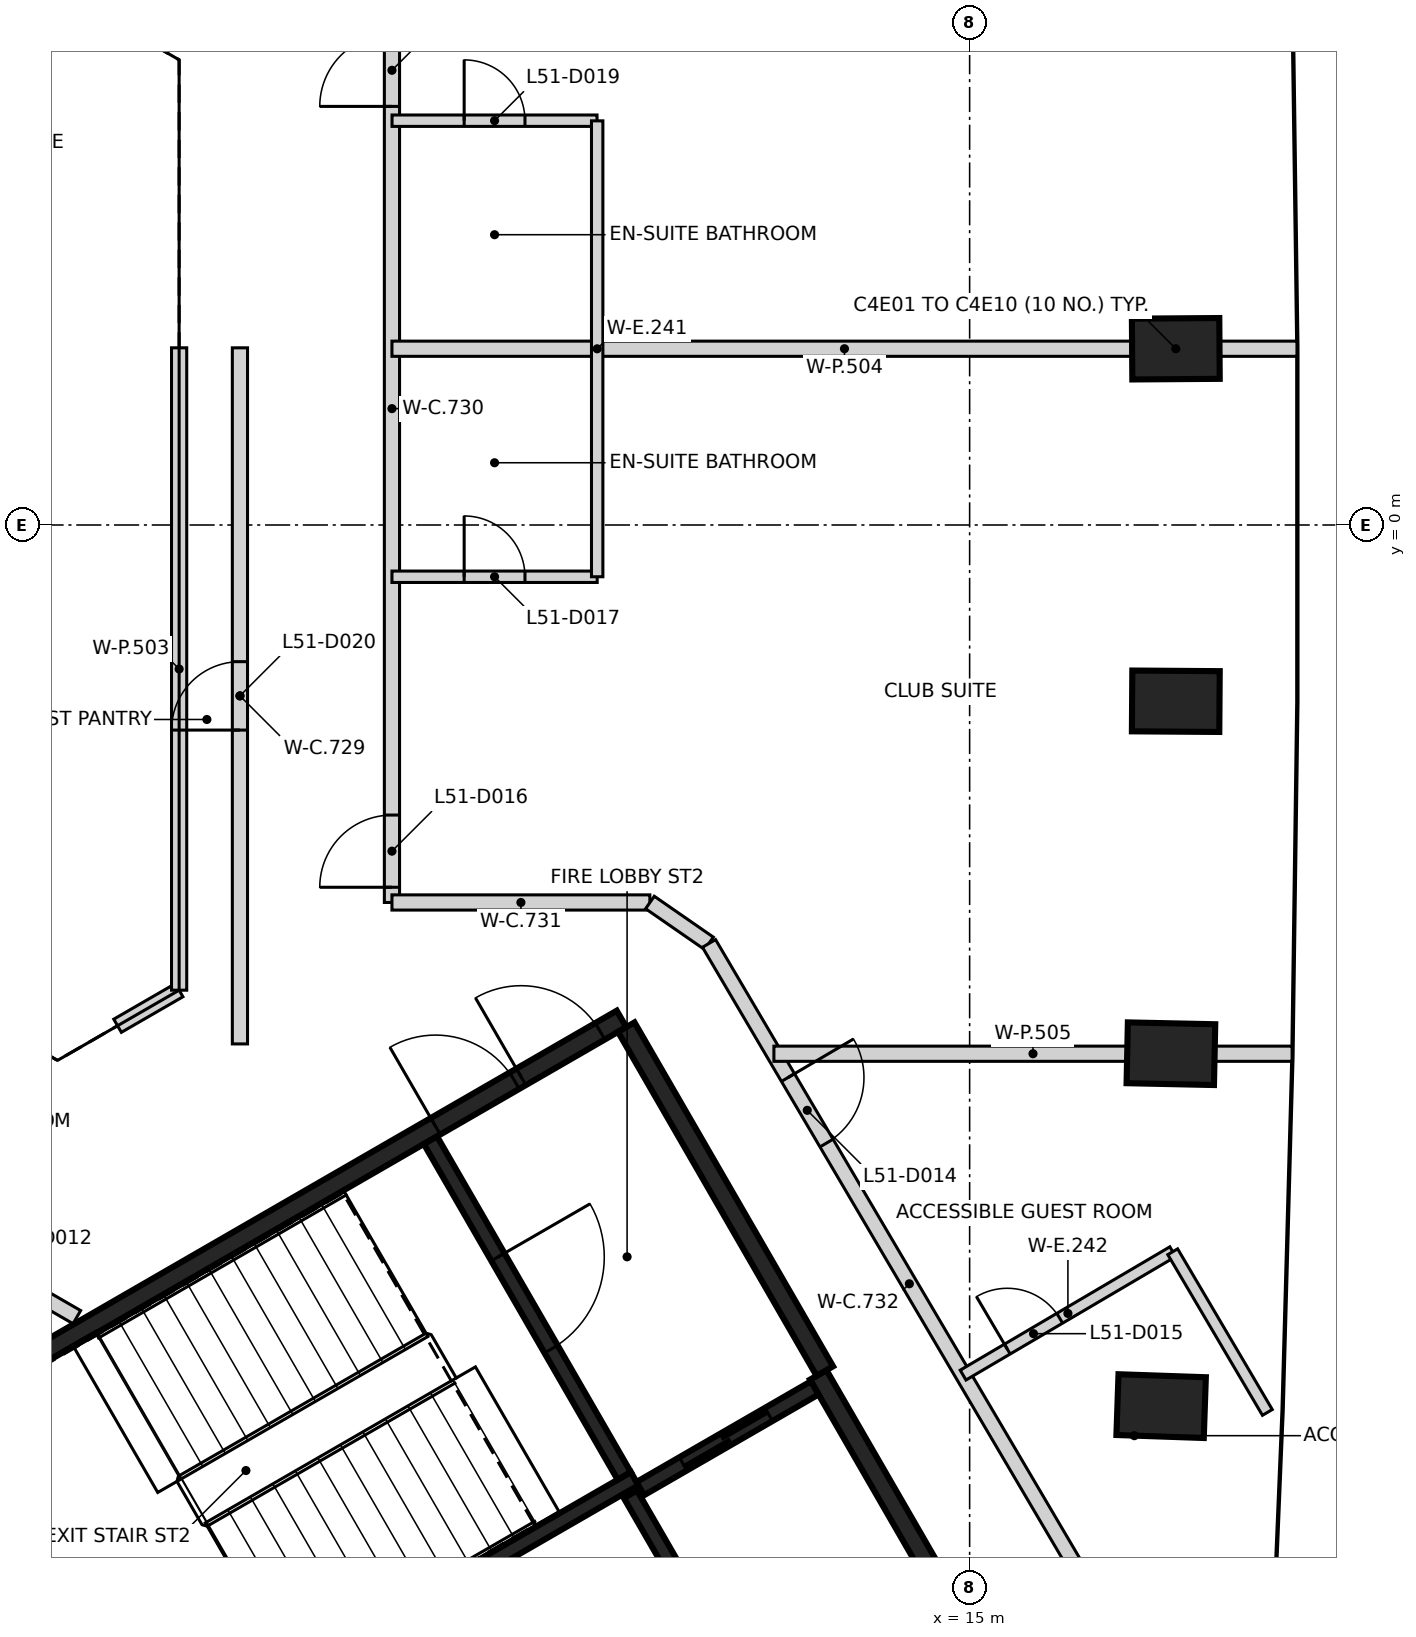
"""IFC4 building model, lengths in metres.
Left out: names, types, materials, properties, quantities, classifications, styles, units other than length and angle.
Written with IfcOpenShell. Run it as: python <this file> out.ifc"""

import sys

from ifc_helpers import new_model, si_unit, direction, frame, frame_2d, origin, origin_2d, place, context, subcontext, project, spatial, rectangle, extrude, element, fill, save


model = new_model("IFC4")
c1 = context("Model", 3, precision=1e-05, world=origin(), true_north=direction((0.0, 1.0)))
c2 = subcontext(c1, "Body", "Model", "MODEL_VIEW")
j1 = project(units=[si_unit("LENGTHUNIT", "METRE"), si_unit("PLANEANGLEUNIT", "RADIAN")], contexts=[c1])
p1 = place(None, origin())
s1 = spatial("IfcSite", under=j1, at=p1, CompositionType="ELEMENT")
p2 = place(p1, origin())
s2 = spatial("IfcBuilding", under=s1, at=p2, CompositionType="ELEMENT")
p3 = place(p2, frame((0.0, 0.0, 204.4)))
s3 = spatial("IfcBuildingStorey", under=s2, at=p3, CompositionType="ELEMENT", Elevation=204.4)
for number, where, z_axis, x_axis in (
    (1, (17.519, -11.592, -0.35), (0.0, 0.0, 1.0), (-0.999, 0.034, 0.0)),
    (2, (17.648, -6.956, -0.35), (0.0, 0.0, 1.0), (-1.0, 0.021, 0.0)),
    (3, (17.712, -2.319, -0.35), (0.0, 0.0, 1.0), (-1.0, 0.007, 0.0)),
    (4, (17.712, 2.319, -0.35), (0.0, 0.0, 1.0), (1.0, 0.007, 0.0)),
):
    element("IfcColumn", number, at=place(p3, frame(where, z_axis=z_axis, x_axis=x_axis)), inside=s3, PredefinedType="COLUMN", context=c2, shape_type="SweptSolid", body=[
        extrude(rectangle(XDim=1.15, YDim=0.8, at=origin_2d()), origin(), (0.0, 0.0, 1.0), 3.6),
    ])
p4 = place(p3, frame((0.417, -12.273, 0.0), z_axis=(0.0, 0.0, 1.0), x_axis=(0.866021906294, 0.500006057782, 0.0)))
e5 = element("IfcWall", 5, at=p4, inside=s3, PredefinedType="SHEAR", context=c2, shape_type="SweptSolid", body=[
    extrude(rectangle(XDim=11.55, YDim=0.25, at=frame_2d((5.775, 0.0))), origin(), (0.0, 0.0, 1.0), 3.25),
])
p5 = place(p4, frame((10.025, 0.0, 0.0)))
e6 = element("IfcOpeningElement", 6, at=p5, cuts=e5, PredefinedType="OPENING", context=c2, shape_type="SweptSolid", body=[
    extrude(rectangle(XDim=1.2, YDim=2.1, at=frame_2d((0.6, 1.05))), frame((0.0, 0.135, 0.0), z_axis=(0.0, -1.0, 0.0), x_axis=(1.0, 0.0, 0.0)), (0.0, 0.0, 1.0), 0.27),
])
p6 = place(p4, frame((8.725, 0.0, 0.0)))
e7 = element("IfcOpeningElement", 7, at=p6, cuts=e5, PredefinedType="OPENING", context=c2, shape_type="SweptSolid", body=[
    extrude(rectangle(XDim=1.2, YDim=2.1, at=frame_2d((0.6, 1.05))), frame((0.0, 0.135, 0.0), z_axis=(0.0, -1.0, 0.0), x_axis=(1.0, 0.0, 0.0)), (0.0, 0.0, 1.0), 0.27),
])
p7 = place(p3, frame((13.008, -11.181, 0.0), z_axis=(0.0, 0.0, 1.0), x_axis=(0.500001955336, -0.866024274868, 0.0)))
e8 = element("IfcWall", 8, at=p7, inside=s3, PredefinedType="SHEAR", context=c2, shape_type="SweptSolid", body=[
    extrude(rectangle(XDim=6.125, YDim=0.25, at=frame_2d((3.062, 0.0))), origin(), (0.0, 0.0, 1.0), 3.25),
])
p8 = place(p7, frame((3.563, 0.0, 0.0)))
e9 = element("IfcOpeningElement", 9, at=p8, cuts=e8, PredefinedType="OPENING", context=c2, shape_type="SweptSolid", body=[
    extrude(rectangle(XDim=1.0, YDim=2.1, at=frame_2d((0.5, 1.05))), frame((0.0, 0.135, 0.0), z_axis=(0.0, -1.0, 0.0), x_axis=(1.0, 0.0, 0.0)), (0.0, 0.0, 1.0), 0.27),
])
p9 = place(p3, frame((3.235, -17.153, 0.0), z_axis=(0.0, 0.0, 1.0), x_axis=(-0.500008851346, 0.866020293397, 0.0)))
e10 = element("IfcWall", 10, at=p9, inside=s3, PredefinedType="SHEAR", context=c2, shape_type="SweptSolid", body=[
    extrude(rectangle(XDim=5.51, YDim=0.25, at=frame_2d((2.755, 0.0))), origin(), (0.0, 0.0, 1.0), 3.25),
])
p10 = place(p3, frame((10.483, -6.606, 0.0), z_axis=(0.0, 0.0, 1.0), x_axis=(0.49999885962, -0.866026062182, 0.0)))
e11 = element("IfcWall", 11, at=p10, inside=s3, PredefinedType="SHEAR", context=c2, shape_type="SweptSolid", body=[
    extrude(rectangle(XDim=5.225, YDim=0.25, at=frame_2d((2.612, 0.0))), origin(), (0.0, 0.0, 1.0), 3.25),
])
p11 = place(p3, frame((5.419, -15.534, 0.0), z_axis=(0.0, 0.0, 1.0), x_axis=(0.866029065029, 0.499993658486, 0.0)))
e12 = element("IfcWall", 12, at=p11, inside=s3, PredefinedType="SHEAR", context=c2, shape_type="SweptSolid", body=[
    extrude(rectangle(XDim=5.974, YDim=0.2, at=frame_2d((2.987, 0.0))), origin(), (0.0, 0.0, 1.0), 3.25),
])
p12 = place(p3, frame((7.906, -8.094, 0.0), z_axis=(0.0, 0.0, 1.0), x_axis=(0.500027839223, -0.866009330205, 0.0)))
e13 = element("IfcWall", 13, at=p12, inside=s3, PredefinedType="SHEAR", context=c2, shape_type="SweptSolid", body=[
    extrude(rectangle(XDim=5.098, YDim=0.2, at=frame_2d((2.549, 0.0))), origin(), (0.0, 0.0, 1.0), 3.25),
])
p13 = place(p12, frame((1.774, 0.0, 0.0)))
e14 = element("IfcOpeningElement", 14, at=p13, cuts=e13, PredefinedType="OPENING", context=c2, shape_type="SweptSolid", body=[
    extrude(rectangle(XDim=1.4, YDim=2.1, at=frame_2d((0.7, 1.05))), frame((0.0, 0.11, 0.0), z_axis=(0.0, -1.0, 0.0), x_axis=(1.0, 0.0, 0.0)), (0.0, 0.0, 1.0), 0.22),
])
p14 = place(p3, frame((12.088, -15.437, 0.0), z_axis=(0.0, 0.0, 1.0), x_axis=(-0.500026960575, 0.86600983753, 0.0)))
e15 = element("IfcWall", 15, at=p14, inside=s3, PredefinedType="SHEAR", context=c2, shape_type="SweptSolid", body=[
    extrude(rectangle(XDim=3.1, YDim=0.2, at=frame_2d((1.55, 0.0))), origin(), (0.0, 0.0, 1.0), 3.25),
])
p15 = place(p3, frame((10.666, -12.678, 0.0), z_axis=(0.0, 0.0, 1.0), x_axis=(0.866018407898, 0.500012117035, 0.0)))
e16 = element("IfcWall", 16, at=p15, inside=s3, PredefinedType="SHEAR", context=c2, shape_type="SweptSolid", body=[
    extrude(rectangle(XDim=2.651, YDim=0.2, at=frame_2d((1.325, 0.0))), origin(), (0.0, 0.0, 1.0), 3.25),
])
p16 = place(p15, frame((0.652, 0.0, 0.0)))
e17 = element("IfcOpeningElement", 17, at=p16, cuts=e16, PredefinedType="OPENING", context=c2, shape_type="SweptSolid", body=[
    extrude(rectangle(XDim=1.3, YDim=2.1, at=frame_2d((0.65, 1.05))), frame((0.0, 0.11, 0.0), z_axis=(0.0, -1.0, 0.0), x_axis=(1.0, 0.0, 0.0)), (0.0, 0.0, 1.0), 0.22),
])
p17 = place(p3, frame((-8.001, -3.926, 0.0), z_axis=(0.0, 0.0, 1.0), x_axis=(0.866131158271, -0.499816783104, 0.0)))
e18 = element("IfcWall", 18, at=p17, inside=s3, PredefinedType="PARTITIONING", context=c2, shape_type="SweptSolid", body=[
    extrude(rectangle(XDim=12.995, YDim=0.2, at=frame_2d((6.498, 0.0))), origin(), (0.0, 0.0, 1.0), 3.25),
])
p18 = place(p17, frame((6.146, 0.0, 0.0)))
e19 = element("IfcOpeningElement", 19, at=p18, cuts=e18, PredefinedType="OPENING", context=c2, shape_type="SweptSolid", body=[
    extrude(rectangle(XDim=0.95, YDim=2.1, at=frame_2d((0.475, 1.05))), frame((0.0, 0.11, 0.0), z_axis=(0.0, -1.0, 0.0), x_axis=(1.0, 0.0, 0.0)), (0.0, 0.0, 1.0), 0.22),
])
p19 = place(p17, frame((10.472, 0.0, 0.0)))
e20 = element("IfcOpeningElement", 20, at=p19, cuts=e18, PredefinedType="OPENING", context=c2, shape_type="SweptSolid", body=[
    extrude(rectangle(XDim=0.95, YDim=2.1, at=frame_2d((0.475, 1.05))), frame((0.0, 0.11, 0.0), z_axis=(0.0, -1.0, 0.0), x_axis=(1.0, 0.0, 0.0)), (0.0, 0.0, 1.0), 0.22),
])
p20 = place(p3, frame((-4.718, 3.511, 0.0), z_axis=(0.0, 0.0, 1.0), x_axis=(0.865989775611, 0.500061704731, 0.0)))
e21 = element("IfcWall", 21, at=p20, inside=s3, PredefinedType="PARTITIONING", context=c2, shape_type="SweptSolid", body=[
    extrude(rectangle(XDim=9.157, YDim=0.2, at=frame_2d((4.579, 0.0))), origin(), (0.0, 0.0, 1.0), 3.25),
])
p21 = place(p20, frame((4.128, 0.0, 0.0)))
e22 = element("IfcOpeningElement", 22, at=p21, cuts=e21, PredefinedType="OPENING", context=c2, shape_type="SweptSolid", body=[
    extrude(rectangle(XDim=0.9, YDim=2.1, at=frame_2d((0.45, 1.05))), frame((0.0, 0.11, 0.0), z_axis=(0.0, -1.0, 0.0), x_axis=(1.0, 0.0, 0.0)), (0.0, 0.0, 1.0), 0.22),
])
p22 = place(p3, frame((5.4, -6.827, 0.0), z_axis=(0.0, 0.0, 1.0), x_axis=(0.0, 1.0, 0.0)))
e23 = element("IfcWall", 23, at=p22, inside=s3, PredefinedType="PARTITIONING", context=c2, shape_type="SweptSolid", body=[
    extrude(rectangle(XDim=9.158, YDim=0.2, at=frame_2d((4.579, 0.0))), origin(), (0.0, 0.0, 1.0), 3.25),
])
p23 = place(p22, frame((4.129, 0.0, 0.0)))
e24 = element("IfcOpeningElement", 24, at=p23, cuts=e23, PredefinedType="OPENING", context=c2, shape_type="SweptSolid", body=[
    extrude(rectangle(XDim=0.9, YDim=2.1, at=frame_2d((0.45, 1.05))), frame((0.0, 0.11, 0.0), z_axis=(0.0, -1.0, 0.0), x_axis=(1.0, 0.0, 0.0)), (0.0, 0.0, 1.0), 0.22),
])
p24 = place(p3, frame((7.4, -4.966, 0.0), z_axis=(0.0, 0.0, 1.0), x_axis=(0.0, 1.0, 0.0)))
e25 = element("IfcWall", 25, at=p24, inside=s3, PredefinedType="PARTITIONING", context=c2, shape_type="SweptSolid", body=[
    extrude(rectangle(XDim=12.994, YDim=0.2, at=frame_2d((6.497, 0.0))), origin(), (0.0, 0.0, 1.0), 3.25),
])
p25 = place(p24, frame((0.2, 0.0, 0.0)))
e26 = element("IfcOpeningElement", 26, at=p25, cuts=e25, PredefinedType="OPENING", context=c2, shape_type="SweptSolid", body=[
    extrude(rectangle(XDim=0.95, YDim=2.1, at=frame_2d((0.475, 1.05))), frame((0.0, 0.11, 0.0), z_axis=(0.0, -1.0, 0.0), x_axis=(1.0, 0.0, 0.0)), (0.0, 0.0, 1.0), 0.22),
])
p26 = place(p24, frame((10.473, 0.0, 0.0)))
e27 = element("IfcOpeningElement", 27, at=p26, cuts=e25, PredefinedType="OPENING", context=c2, shape_type="SweptSolid", body=[
    extrude(rectangle(XDim=0.95, YDim=2.1, at=frame_2d((0.475, 1.05))), frame((0.0, 0.11, 0.0), z_axis=(0.0, -1.0, 0.0), x_axis=(1.0, 0.0, 0.0)), (0.0, 0.0, 1.0), 0.22),
])
p27 = place(p3, frame((7.4, -4.966, 0.0), z_axis=(0.0, 0.0, 1.0), x_axis=(1.0, 0.0, 0.0)))
e28 = element("IfcWall", 28, at=p27, inside=s3, PredefinedType="PARTITIONING", context=c2, shape_type="SweptSolid", body=[
    extrude(rectangle(XDim=3.393, YDim=0.2, at=frame_2d((1.697, 0.0))), origin(), (0.0, 0.0, 1.0), 3.25),
])
p28 = place(p3, frame((10.794, -4.966, 0.0), z_axis=(0.0, 0.0, 1.0), x_axis=(0.822266583859, -0.569102508401, 0.0)))
e29 = element("IfcWall", 29, at=p28, inside=s3, PredefinedType="PARTITIONING", context=c2, shape_type="SweptSolid", body=[
    extrude(rectangle(XDim=0.945, YDim=0.2, at=frame_2d((0.473, 0.0))), origin(), (0.0, 0.0, 1.0), 3.25),
])
p29 = place(p3, frame((11.571, -5.505, 0.0), z_axis=(0.0, 0.0, 1.0), x_axis=(0.507266536157, -0.861789220921, 0.0)))
e30 = element("IfcWall", 30, at=p29, inside=s3, PredefinedType="PARTITIONING", context=c2, shape_type="SweptSolid", body=[
    extrude(rectangle(XDim=10.391, YDim=0.2, at=frame_2d((5.195, 0.0))), origin(), (0.0, 0.0, 1.0), 3.25),
])
p30 = place(p29, frame((2.048, 0.0, 0.0)))
e31 = element("IfcOpeningElement", 31, at=p30, cuts=e30, PredefinedType="OPENING", context=c2, shape_type="SweptSolid", body=[
    extrude(rectangle(XDim=1.0, YDim=2.1, at=frame_2d((0.5, 1.05))), frame((0.0, 0.11, 0.0), z_axis=(0.0, -1.0, 0.0), x_axis=(1.0, 0.0, 0.0)), (0.0, 0.0, 1.0), 0.22),
])
p31 = place(p3, frame((-4.318, 2.819, 0.0), z_axis=(0.0, 0.0, 1.0), x_axis=(0.866038843867, 0.499976720371, 0.0)))
e32 = element("IfcWall", 32, at=p31, inside=s3, PredefinedType="PARTITIONING", context=c2, shape_type="SweptSolid", body=[
    extrude(rectangle(XDim=8.45, YDim=0.2, at=frame_2d((4.225, 0.0))), origin(), (0.0, 0.0, 1.0), 3.25),
])
p32 = place(p3, frame((3.79, -6.588, 0.0), z_axis=(0.0, 0.0, 1.0), x_axis=(0.865985641702, 0.500068863623, 0.0)))
e33 = element("IfcWall", 33, at=p32, inside=s3, PredefinedType="PARTITIONING", context=c2, shape_type="SweptSolid", body=[
    extrude(rectangle(XDim=0.935, YDim=0.2, at=frame_2d((0.468, 0.0))), origin(), (0.0, 0.0, 1.0), 3.25),
])
p33 = place(p3, frame((4.6, -6.12, 0.0), z_axis=(0.0, 0.0, 1.0), x_axis=(0.0, 1.0, 0.0)))
e34 = element("IfcWall", 34, at=p33, inside=s3, PredefinedType="PARTITIONING", context=c2, shape_type="SweptSolid", body=[
    extrude(rectangle(XDim=8.451, YDim=0.2, at=frame_2d((4.226, 0.0))), origin(), (0.0, 0.0, 1.0), 3.25),
])
p34 = place(p3, frame((7.4, 2.319, 0.0), z_axis=(0.0, 0.0, 1.0), x_axis=(1.0, 0.0, 0.0)))
e35 = element("IfcWall", 35, at=p34, inside=s3, PredefinedType="PARTITIONING", context=c2, shape_type="SweptSolid", body=[
    extrude(rectangle(XDim=11.906, YDim=0.2, at=frame_2d((5.953, 0.0))), origin(), (0.0, 0.0, 1.0), 3.25),
])
p35 = place(p3, frame((12.425, -6.956, 0.0), z_axis=(0.0, 0.0, 1.0), x_axis=(1.0, 0.0, 0.0)))
e36 = element("IfcWall", 36, at=p35, inside=s3, PredefinedType="PARTITIONING", context=c2, shape_type="SweptSolid", body=[
    extrude(rectangle(XDim=6.817, YDim=0.2, at=frame_2d((3.409, 0.0))), origin(), (0.0, 0.0, 1.0), 3.25),
])
p36 = place(p3, frame((7.4, -0.681, 0.0), z_axis=(0.0, 0.0, 1.0), x_axis=(1.0, 0.0, 0.0)))
e37 = element("IfcWall", 37, at=p36, inside=s3, PredefinedType="PARTITIONING", context=c2, shape_type="SweptSolid", body=[
    extrude(rectangle(XDim=2.7, YDim=0.15, at=frame_2d((1.35, 0.0))), origin(), (0.0, 0.0, 1.0), 3.25),
])
p37 = place(p36, frame((0.95, 0.0, 0.0)))
e38 = element("IfcOpeningElement", 38, at=p37, cuts=e37, PredefinedType="OPENING", context=c2, shape_type="SweptSolid", body=[
    extrude(rectangle(XDim=0.8, YDim=2.1, at=frame_2d((0.4, 1.05))), frame((0.0, 0.085, 0.0), z_axis=(0.0, -1.0, 0.0), x_axis=(1.0, 0.0, 0.0)), (0.0, 0.0, 1.0), 0.17),
])
p38 = place(p3, frame((7.401, 5.319, 0.0), z_axis=(0.0, 0.0, 1.0), x_axis=(1.0, 0.0, 0.0)))
e39 = element("IfcWall", 39, at=p38, inside=s3, PredefinedType="PARTITIONING", context=c2, shape_type="SweptSolid", body=[
    extrude(rectangle(XDim=2.697, YDim=0.15, at=frame_2d((1.349, 0.0))), origin(), (0.0, 0.0, 1.0), 3.25),
])
p39 = place(p38, frame((0.949, 0.0, 0.0)))
e40 = element("IfcOpeningElement", 40, at=p39, cuts=e39, PredefinedType="OPENING", context=c2, shape_type="SweptSolid", body=[
    extrude(rectangle(XDim=0.8, YDim=2.1, at=frame_2d((0.4, 1.05))), frame((0.0, 0.085, 0.0), z_axis=(0.0, -1.0, 0.0), x_axis=(1.0, 0.0, 0.0)), (0.0, 0.0, 1.0), 0.17),
])
p40 = place(p3, frame((10.1, -0.681, 0.0), z_axis=(0.0, 0.0, 1.0), x_axis=(0.0, 1.0, 0.0)))
e41 = element("IfcWall", 41, at=p40, inside=s3, PredefinedType="PARTITIONING", context=c2, shape_type="SweptSolid", body=[
    extrude(rectangle(XDim=5.998, YDim=0.15, at=frame_2d((2.999, 0.0))), origin(), (0.0, 0.0, 1.0), 3.25),
])
p41 = place(p3, frame((14.914, -11.184, 0.0), z_axis=(0.0, 0.0, 1.0), x_axis=(0.861843987552, 0.507173482273, 0.0)))
e42 = element("IfcWall", 42, at=p41, inside=s3, PredefinedType="PARTITIONING", context=c2, shape_type="SweptSolid", body=[
    extrude(rectangle(XDim=3.2, YDim=0.15, at=frame_2d((1.6, 0.0))), origin(), (0.0, 0.0, 1.0), 2.35),
])
p42 = place(p41, frame((0.675, 0.0, 0.0)))
e43 = element("IfcOpeningElement", 43, at=p42, cuts=e42, PredefinedType="OPENING", context=c2, shape_type="SweptSolid", body=[
    extrude(rectangle(XDim=0.8, YDim=2.1, at=frame_2d((0.4, 1.05))), frame((0.0, 0.085, 0.0), z_axis=(0.0, -1.0, 0.0), x_axis=(1.0, 0.0, 0.0)), (0.0, 0.0, 1.0), 0.17),
])
p43 = place(p3, frame((17.672, -9.561, 0.0), z_axis=(0.0, 0.0, 1.0), x_axis=(0.507424524348, -0.86169620638, 0.0)))
e44 = element("IfcWall", 44, at=p43, inside=s3, PredefinedType="PARTITIONING", context=c2, shape_type="SweptSolid", body=[
    extrude(rectangle(XDim=2.453, YDim=0.15, at=frame_2d((1.227, 0.0))), origin(), (0.0, 0.0, 1.0), 2.35),
])
p44 = place(p16, origin())
e45 = element("IfcDoor", 45, at=p44, inside=s3, OperationType="SLIDING_TO_RIGHT", PredefinedType="DOOR", context=c2, shape_type="SweptSolid", body=[
    extrude(rectangle(XDim=1.3, YDim=2.1, at=frame_2d((0.65, 1.05))), frame((0.0, 0.025, 0.0), z_axis=(0.0, -1.0, 0.0), x_axis=(1.0, 0.0, 0.0)), (0.0, 0.0, 1.0), 0.05),
])
fill(e17, e45)
p45 = place(p5, origin())
e46 = element("IfcDoor", 46, at=p45, inside=s3, OperationType="SINGLE_SWING_LEFT", PredefinedType="DOOR", context=c2, shape_type="SweptSolid", body=[
    extrude(rectangle(XDim=1.2, YDim=2.1, at=frame_2d((0.6, 1.05))), frame((0.0, 0.025, 0.0), z_axis=(0.0, -1.0, 0.0), x_axis=(1.0, 0.0, 0.0)), (0.0, 0.0, 1.0), 0.05),
])
fill(e6, e46)
p46 = place(p6, origin())
e47 = element("IfcDoor", 47, at=p46, inside=s3, OperationType="SINGLE_SWING_RIGHT", PredefinedType="DOOR", context=c2, shape_type="SweptSolid", body=[
    extrude(rectangle(XDim=1.2, YDim=2.1, at=frame_2d((0.6, 1.05))), frame((0.0, 0.025, 0.0), z_axis=(0.0, -1.0, 0.0), x_axis=(1.0, 0.0, 0.0)), (0.0, 0.0, 1.0), 0.05),
])
fill(e7, e47)
p47 = place(p13, origin())
e48 = element("IfcDoor", 48, at=p47, inside=s3, OperationType="SINGLE_SWING_RIGHT", PredefinedType="DOOR", context=c2, shape_type="SweptSolid", body=[
    extrude(rectangle(XDim=1.4, YDim=2.1, at=frame_2d((0.7, 1.05))), frame((0.0, 0.025, 0.0), z_axis=(0.0, -1.0, 0.0), x_axis=(1.0, 0.0, 0.0)), (0.0, 0.0, 1.0), 0.05),
])
fill(e14, e48)
p48 = place(p30, origin())
e49 = element("IfcDoor", 49, at=p48, inside=s3, OperationType="SINGLE_SWING_LEFT", PredefinedType="DOOR", context=c2, shape_type="SweptSolid", body=[
    extrude(rectangle(XDim=1.0, YDim=2.1, at=frame_2d((0.5, 1.05))), frame((0.0, 0.025, 0.0), z_axis=(0.0, -1.0, 0.0), x_axis=(1.0, 0.0, 0.0)), (0.0, 0.0, 1.0), 0.05),
])
fill(e31, e49)
p49 = place(p42, origin())
e50 = element("IfcDoor", 50, at=p49, inside=s3, OperationType="SINGLE_SWING_LEFT", PredefinedType="DOOR", context=c2, shape_type="SweptSolid", body=[
    extrude(rectangle(XDim=0.8, YDim=2.1, at=frame_2d((0.4, 1.05))), frame((0.0, 0.025, 0.0), z_axis=(0.0, -1.0, 0.0), x_axis=(1.0, 0.0, 0.0)), (0.0, 0.0, 1.0), 0.05),
])
fill(e43, e50)
p50 = place(p25, frame((0.95, 0.0, 0.0), z_axis=(0.0, 0.0, 1.0), x_axis=(-1.0, 0.0, 0.0)))
e51 = element("IfcDoor", 51, at=p50, inside=s3, OperationType="SINGLE_SWING_LEFT", PredefinedType="DOOR", context=c2, shape_type="SweptSolid", body=[
    extrude(rectangle(XDim=0.95, YDim=2.1, at=frame_2d((0.475, 1.05))), frame((0.0, 0.025, 0.0), z_axis=(0.0, -1.0, 0.0), x_axis=(1.0, 0.0, 0.0)), (0.0, 0.0, 1.0), 0.05),
])
fill(e26, e51)
p51 = place(p37, frame((0.8, 0.0, 0.0), z_axis=(0.0, 0.0, 1.0), x_axis=(-1.0, 0.0, 0.0)))
e52 = element("IfcDoor", 52, at=p51, inside=s3, OperationType="SINGLE_SWING_LEFT", PredefinedType="DOOR", context=c2, shape_type="SweptSolid", body=[
    extrude(rectangle(XDim=0.8, YDim=2.1, at=frame_2d((0.4, 1.05))), frame((0.0, 0.025, 0.0), z_axis=(0.0, -1.0, 0.0), x_axis=(1.0, 0.0, 0.0)), (0.0, 0.0, 1.0), 0.05),
])
fill(e38, e52)
p52 = place(p26, frame((0.95, 0.0, 0.0), z_axis=(0.0, 0.0, 1.0), x_axis=(-1.0, 0.0, 0.0)))
e53 = element("IfcDoor", 53, at=p52, inside=s3, OperationType="SINGLE_SWING_LEFT", PredefinedType="DOOR", context=c2, shape_type="SweptSolid", body=[
    extrude(rectangle(XDim=0.95, YDim=2.1, at=frame_2d((0.475, 1.05))), frame((0.0, 0.025, 0.0), z_axis=(0.0, -1.0, 0.0), x_axis=(1.0, 0.0, 0.0)), (0.0, 0.0, 1.0), 0.05),
])
fill(e27, e53)
p53 = place(p39, origin())
e54 = element("IfcDoor", 54, at=p53, inside=s3, OperationType="SINGLE_SWING_LEFT", PredefinedType="DOOR", context=c2, shape_type="SweptSolid", body=[
    extrude(rectangle(XDim=0.8, YDim=2.1, at=frame_2d((0.4, 1.05))), frame((0.0, 0.025, 0.0), z_axis=(0.0, -1.0, 0.0), x_axis=(1.0, 0.0, 0.0)), (0.0, 0.0, 1.0), 0.05),
])
fill(e40, e54)
p54 = place(p23, origin())
e55 = element("IfcDoor", 55, at=p54, inside=s3, OperationType="SINGLE_SWING_LEFT", PredefinedType="DOOR", context=c2, shape_type="SweptSolid", body=[
    extrude(rectangle(XDim=0.9, YDim=2.1, at=frame_2d((0.45, 1.05))), frame((0.0, 0.025, 0.0), z_axis=(0.0, -1.0, 0.0), x_axis=(1.0, 0.0, 0.0)), (0.0, 0.0, 1.0), 0.05),
])
fill(e24, e55)
save(model, sys.argv[1])
